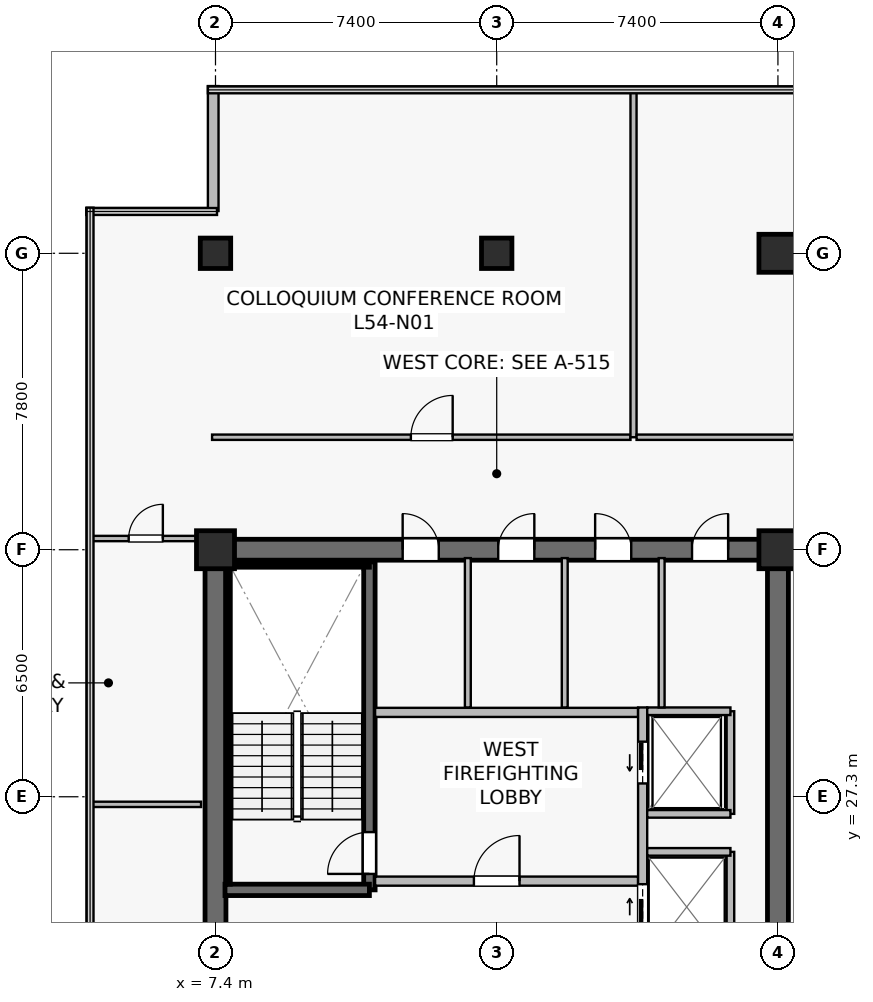
"""IFC4 building model, lengths in metres.
Left out: names, types, materials, properties, quantities, classifications, styles, units other than length and angle.
Written with IfcOpenShell. Run it as: python <this file> out.ifc"""

import sys

from ifc_helpers import new_model, si_unit, direction, frame, frame_2d, origin, origin_2d, place, context, subcontext, project, spatial, rectangle, extrude, source, transform, mapped, element, fill, save


model = new_model("IFC4")
c1 = context("Model", 3, precision=1e-05, world=origin(), true_north=direction((0.0, 1.0)))
c2 = subcontext(c1, "Body", "Model", "MODEL_VIEW")
j1 = project(units=[si_unit("LENGTHUNIT", "METRE"), si_unit("PLANEANGLEUNIT", "RADIAN")], contexts=[c1])
p1 = place(None, origin())
s1 = spatial("IfcSite", under=j1, at=p1, CompositionType="ELEMENT")
p2 = place(p1, origin())
s2 = spatial("IfcBuilding", under=s1, at=p2, CompositionType="ELEMENT")
p3 = place(p2, frame((0.0, 0.0, 226.0)))
s3 = spatial("IfcBuildingStorey", under=s2, at=p3, CompositionType="ELEMENT", Elevation=226.0)
p4 = place(p3, frame((7.125, 33.8, 0.0), z_axis=(0.0, 0.0, 1.0), x_axis=(1.0, 0.0, 0.0)))
e1 = element("IfcWall", 1, at=p4, inside=s3, PredefinedType="SHEAR", context=c2, shape_type="SweptSolid", body=[
    extrude(rectangle(XDim=15.35, YDim=0.55, at=frame_2d((7.675, 0.0))), origin(), (0.0, 0.0, 1.0), 3.8),
])
p5 = place(p4, frame((5.2, 0.0, 0.0)))
e2 = element("IfcOpeningElement", 2, at=p5, cuts=e1, PredefinedType="OPENING", context=c2, shape_type="SweptSolid", body=[
    extrude(rectangle(XDim=0.95, YDim=2.15, at=frame_2d((0.475, 1.075))), frame((0.0, 0.285, 0.0), z_axis=(0.0, -1.0, 0.0), x_axis=(1.0, 0.0, 0.0)), (0.0, 0.0, 1.0), 0.57),
])
p6 = place(p4, frame((7.715, 0.0, 0.0)))
e3 = element("IfcOpeningElement", 3, at=p6, cuts=e1, PredefinedType="OPENING", context=c2, shape_type="SweptSolid", body=[
    extrude(rectangle(XDim=0.95, YDim=2.15, at=frame_2d((0.475, 1.075))), frame((0.0, 0.285, 0.0), z_axis=(0.0, -1.0, 0.0), x_axis=(1.0, 0.0, 0.0)), (0.0, 0.0, 1.0), 0.57),
])
p7 = place(p4, frame((10.265, 0.0, 0.0)))
e4 = element("IfcOpeningElement", 4, at=p7, cuts=e1, PredefinedType="OPENING", context=c2, shape_type="SweptSolid", body=[
    extrude(rectangle(XDim=0.95, YDim=2.15, at=frame_2d((0.475, 1.075))), frame((0.0, 0.285, 0.0), z_axis=(0.0, -1.0, 0.0), x_axis=(1.0, 0.0, 0.0)), (0.0, 0.0, 1.0), 0.57),
])
p8 = place(p4, frame((12.815, 0.0, 0.0)))
e5 = element("IfcOpeningElement", 5, at=p8, cuts=e1, PredefinedType="OPENING", context=c2, shape_type="SweptSolid", body=[
    extrude(rectangle(XDim=0.95, YDim=2.15, at=frame_2d((0.475, 1.075))), frame((0.0, 0.285, 0.0), z_axis=(0.0, -1.0, 0.0), x_axis=(1.0, 0.0, 0.0)), (0.0, 0.0, 1.0), 0.57),
])
p9 = place(p3, frame((7.4, 15.075, 0.0), z_axis=(0.0, 0.0, 1.0), x_axis=(0.0, 1.0, 0.0)))
e6 = element("IfcWall", 6, at=p9, inside=s3, PredefinedType="SHEAR", context=c2, shape_type="SweptSolid", body=[
    extrude(rectangle(XDim=18.45, YDim=0.55, at=frame_2d((9.225, 0.0))), origin(), (0.0, 0.0, 1.0), 3.8),
])
p10 = place(p3, frame((22.2, 15.075, 0.0), z_axis=(0.0, 0.0, 1.0), x_axis=(0.0, 1.0, 0.0)))
e7 = element("IfcWall", 7, at=p10, inside=s3, PredefinedType="SHEAR", context=c2, shape_type="SweptSolid", body=[
    extrude(rectangle(XDim=18.45, YDim=0.55, at=frame_2d((9.225, 0.0))), origin(), (0.0, 0.0, 1.0), 3.8),
])
p11 = place(p10, frame((3.475, 0.0, 0.0)))
e8 = element("IfcOpeningElement", 8, at=p11, cuts=e7, PredefinedType="OPENING", context=c2, shape_type="SweptSolid", body=[
    extrude(rectangle(XDim=1.42, YDim=2.2, at=frame_2d((0.71, 1.1))), frame((0.0, 0.285, 0.0), z_axis=(0.0, -1.0, 0.0), x_axis=(1.0, 0.0, 0.0)), (0.0, 0.0, 1.0), 0.57),
])
p12 = place(p3, frame((11.45, 24.85, 0.0), z_axis=(0.0, 0.0, 1.0), x_axis=(0.0, 1.0, 0.0)))
e9 = element("IfcWall", 9, at=p12, inside=s3, PredefinedType="SHEAR", context=c2, shape_type="SweptSolid", body=[
    extrude(rectangle(XDim=8.63, YDim=0.3, at=frame_2d((4.315, 0.0))), origin(), (0.0, 0.0, 1.0), 3.8),
])
p13 = place(p12, frame((0.42, 0.0, 0.0)))
e10 = element("IfcOpeningElement", 10, at=p13, cuts=e9, PredefinedType="OPENING", context=c2, shape_type="SweptSolid", body=[
    extrude(rectangle(XDim=1.1, YDim=2.15, at=frame_2d((0.55, 1.075))), frame((0.0, 0.16, 0.0), z_axis=(0.0, -1.0, 0.0), x_axis=(1.0, 0.0, 0.0)), (0.0, 0.0, 1.0), 0.32),
])
p14 = place(p3, frame((7.65, 24.85, 0.0), z_axis=(0.0, 0.0, 1.0), x_axis=(1.0, 0.0, 0.0)))
e11 = element("IfcWall", 11, at=p14, inside=s3, PredefinedType="SHEAR", context=c2, shape_type="SweptSolid", body=[
    extrude(rectangle(XDim=3.8, YDim=0.3, at=frame_2d((1.9, 0.0))), origin(), (0.0, 0.0, 1.0), 3.8),
])
p15 = place(p3, frame((7.73, 33.4, 0.0), z_axis=(0.0, 0.0, 1.0), x_axis=(1.0, 0.0, 0.0)))
e12 = element("IfcWall", 12, at=p15, inside=s3, PredefinedType="SOLIDWALL", context=c2, shape_type="SweptSolid", body=[
    extrude(rectangle(XDim=3.72, YDim=0.12, at=frame_2d((1.86, 0.0))), origin(), (0.0, 0.0, 1.0), 3.8),
])
p16 = place(p3, frame((7.73, 25.0, 0.0), z_axis=(0.0, 0.0, 1.0), x_axis=(0.0, 1.0, 0.0)))
e13 = element("IfcWall", 13, at=p16, inside=s3, PredefinedType="SOLIDWALL", context=c2, shape_type="SweptSolid", body=[
    extrude(rectangle(XDim=8.32, YDim=0.12, at=frame_2d((4.16, 0.0))), origin(), (0.0, 0.0, 1.0), 3.8),
])
m1 = source(origin(), c2, "Body", "SweptSolid", [
    extrude(rectangle(XDim=1.0, YDim=1.0, at=origin_2d()), origin(), (0.0, 0.0, 1.0), 4.1),
])
for number, where, z_axis, x_axis in (
    (14, (7.4, 33.8, 0.0), (0.0, 0.0, 1.0), (1.0, 0.0, 0.0)),
    (15, (22.2, 33.8, 0.0), (0.0, 0.0, 1.0), (1.0, 0.0, 0.0)),
):
    element("IfcColumn", number, at=place(p3, frame(where, z_axis=z_axis, x_axis=x_axis)), inside=s3, PredefinedType="COLUMN", context=c2, shape_type="MappedRepresentation", body=[
        mapped(m1, transform((0.0, 0.0, 0.0), scale=1.0)),
    ])
m2 = source(origin(), c2, "Body", "SweptSolid", [
    extrude(rectangle(XDim=0.8, YDim=0.8, at=origin_2d()), origin(), (0.0, 0.0, 1.0), 4.1),
])
p17 = place(p3, frame((14.8, 41.6, 0.0), z_axis=(0.0, 0.0, 1.0), x_axis=(1.0, 0.0, 0.0)))
e16 = element("IfcColumn", 16, at=p17, inside=s3, PredefinedType="COLUMN", context=c2, shape_type="MappedRepresentation", body=[
    mapped(m2, transform((0.0, 0.0, 0.0), scale=1.0)),
])
p18 = place(p3, frame((22.2, 41.6, 0.0), z_axis=(0.0, 0.0, 1.0), x_axis=(1.0, 0.0, 0.0)))
e17 = element("IfcColumn", 17, at=p18, inside=s3, PredefinedType="COLUMN", context=c2, shape_type="MappedRepresentation", body=[
    mapped(m1, transform((0.0, 0.0, 0.0), scale=1.0)),
])
p19 = place(p3, frame((7.4, 41.6, 0.0), z_axis=(0.0, 0.0, 1.0), x_axis=(1.0, 0.0, 0.0)))
e18 = element("IfcColumn", 18, at=p19, inside=s3, PredefinedType="COLUMN", context=c2, shape_type="MappedRepresentation", body=[
    mapped(m2, transform((0.0, 0.0, 0.0), scale=1.0)),
])
p20 = place(p3, frame((7.34, 46.0, 0.0), z_axis=(0.0, 0.0, 1.0), x_axis=(0.0, -1.0, 0.0)))
e19 = element("IfcWall", 19, at=p20, inside=s3, PredefinedType="STANDARD", context=c2, shape_type="SweptSolid", body=[
    extrude(rectangle(XDim=3.288, YDim=0.28, at=frame_2d((1.644, 0.0))), origin(), (0.0, 0.0, 1.0), 3.8),
])
p21 = place(p3, frame((11.6, 25.08, 0.0), z_axis=(0.0, 0.0, 1.0), x_axis=(1.0, 0.0, 0.0)))
e20 = element("IfcWall", 20, at=p21, inside=s3, PredefinedType="SOLIDWALL", context=c2, shape_type="SweptSolid", body=[
    extrude(rectangle(XDim=6.92, YDim=0.24, at=frame_2d((3.46, 0.0))), origin(), (0.0, 0.0, 1.0), 3.197),
])
p22 = place(p21, frame((2.6, 0.0, 0.0)))
e21 = element("IfcOpeningElement", 21, at=p22, cuts=e20, PredefinedType="OPENING", context=c2, shape_type="SweptSolid", body=[
    extrude(rectangle(XDim=1.2, YDim=2.16, at=frame_2d((0.6, 1.08))), frame((0.0, 0.13, 0.0), z_axis=(0.0, -1.0, 0.0), x_axis=(1.0, 0.0, 0.0)), (0.0, 0.0, 1.0), 0.26),
])
p23 = place(p3, frame((11.6, 29.52, 0.0), z_axis=(0.0, 0.0, 1.0), x_axis=(1.0, 0.0, 0.0)))
e22 = element("IfcWall", 22, at=p23, inside=s3, PredefinedType="SOLIDWALL", context=c2, shape_type="SweptSolid", body=[
    extrude(rectangle(XDim=6.92, YDim=0.24, at=frame_2d((3.46, 0.0))), origin(), (0.0, 0.0, 1.0), 3.197),
])
p24 = place(p3, frame((18.64, 22.8, 0.0), z_axis=(0.0, 0.0, 1.0), x_axis=(0.0, 1.0, 0.0)))
e23 = element("IfcWall", 23, at=p24, inside=s3, PredefinedType="SOLIDWALL", context=c2, shape_type="SweptSolid", body=[
    extrude(rectangle(XDim=6.85, YDim=0.24, at=frame_2d((3.425, 0.0))), origin(), (0.0, 0.0, 1.0), 2.935),
])
p25 = place(p24, frame((4.85, 0.0, 0.0)))
e24 = element("IfcOpeningElement", 24, at=p25, cuts=e23, PredefinedType="OPENING", context=c2, shape_type="SweptSolid", body=[
    extrude(rectangle(XDim=1.1, YDim=2.22, at=frame_2d((0.55, 1.11))), frame((0.0, 0.13, 0.0), z_axis=(0.0, -1.0, 0.0), x_axis=(1.0, 0.0, 0.0)), (0.0, 0.0, 1.0), 0.26),
])
p26 = place(p24, frame((1.0, 0.0, 0.0)))
e25 = element("IfcOpeningElement", 25, at=p26, cuts=e23, PredefinedType="OPENING", context=c2, shape_type="SweptSolid", body=[
    extrude(rectangle(XDim=1.2, YDim=2.22, at=frame_2d((0.6, 1.11))), frame((0.0, 0.13, 0.0), z_axis=(0.0, -1.0, 0.0), x_axis=(1.0, 0.0, 0.0)), (0.0, 0.0, 1.0), 0.26),
])
p27 = place(p3, frame((20.95, 26.85, 0.0), z_axis=(0.0, 0.0, 1.0), x_axis=(0.0, 1.0, 0.0)))
e26 = element("IfcWall", 26, at=p27, inside=s3, PredefinedType="SOLIDWALL", context=c2, shape_type="SweptSolid", body=[
    extrude(rectangle(XDim=2.7, YDim=0.2, at=frame_2d((1.35, 0.0))), origin(), (0.0, 0.0, 1.0), 3.8),
])
p28 = place(p3, frame((18.76, 29.55, 0.0), z_axis=(0.0, 0.0, 1.0), x_axis=(1.0, 0.0, 0.0)))
e27 = element("IfcWall", 27, at=p28, inside=s3, PredefinedType="SOLIDWALL", context=c2, shape_type="SweptSolid", body=[
    extrude(rectangle(XDim=2.19, YDim=0.2, at=frame_2d((1.095, 0.0))), origin(), (0.0, 0.0, 1.0), 3.8),
])
p29 = place(p3, frame((18.76, 26.85, 0.0), z_axis=(0.0, 0.0, 1.0), x_axis=(1.0, 0.0, 0.0)))
e28 = element("IfcWall", 28, at=p29, inside=s3, PredefinedType="SOLIDWALL", context=c2, shape_type="SweptSolid", body=[
    extrude(rectangle(XDim=2.19, YDim=0.2, at=frame_2d((1.095, 0.0))), origin(), (0.0, 0.0, 1.0), 3.197),
])
p30 = place(p3, frame((20.95, 22.95, 0.0), z_axis=(0.0, 0.0, 1.0), x_axis=(0.0, 1.0, 0.0)))
e29 = element("IfcWall", 29, at=p30, inside=s3, PredefinedType="SOLIDWALL", context=c2, shape_type="SweptSolid", body=[
    extrude(rectangle(XDim=2.9, YDim=0.2, at=frame_2d((1.45, 0.0))), origin(), (0.0, 0.0, 1.0), 2.935),
])
p31 = place(p3, frame((18.76, 25.85, 0.0), z_axis=(0.0, 0.0, 1.0), x_axis=(1.0, 0.0, 0.0)))
e30 = element("IfcWall", 30, at=p31, inside=s3, PredefinedType="SOLIDWALL", context=c2, shape_type="SweptSolid", body=[
    extrude(rectangle(XDim=2.19, YDim=0.2, at=frame_2d((1.095, 0.0))), origin(), (0.0, 0.0, 1.0), 3.8),
])
for number, where, z_axis, x_axis in (
    (31, (14.04, 29.65, 0.0), (0.0, 0.0, 1.0), (0.0, 1.0, 0.0)),
    (32, (16.59, 29.65, 0.0), (0.0, 0.0, 1.0), (0.0, 1.0, 0.0)),
    (33, (19.14, 29.65, 0.0), (0.0, 0.0, 1.0), (0.0, 1.0, 0.0)),
):
    element("IfcWall", number, at=place(p3, frame(where, z_axis=z_axis, x_axis=x_axis)), inside=s3, PredefinedType="PLUMBINGWALL", context=c2, shape_type="SweptSolid", body=[
        extrude(rectangle(XDim=3.93, YDim=0.155, at=frame_2d((1.965, 0.0))), origin(), (0.0, 0.0, 1.0), 3.8),
    ])
p32 = place(p3, frame((7.31, 36.76, 0.0), z_axis=(0.0, 0.0, 1.0), x_axis=(1.0, 0.0, 0.0)))
e34 = element("IfcWall", 34, at=p32, inside=s3, PredefinedType="PARTITIONING", context=c2, shape_type="SweptSolid", body=[
    extrude(rectangle(XDim=11.01, YDim=0.14, at=frame_2d((5.505, 0.0))), origin(), (0.0, 0.0, 1.0), 3.197),
])
p33 = place(p32, frame((5.231, 0.0, 0.0)))
e35 = element("IfcOpeningElement", 35, at=p33, cuts=e34, PredefinedType="OPENING", context=c2, shape_type="SweptSolid", body=[
    extrude(rectangle(XDim=1.1, YDim=2.18, at=frame_2d((0.55, 1.09))), frame((0.0, 0.08, 0.0), z_axis=(0.0, -1.0, 0.0), x_axis=(1.0, 0.0, 0.0)), (0.0, 0.0, 1.0), 0.16),
])
p34 = place(p3, frame((18.4, 36.76, 0.0), z_axis=(0.0, 0.0, 1.0), x_axis=(0.0, 1.0, 0.0)))
e36 = element("IfcWall", 36, at=p34, inside=s3, PredefinedType="PARTITIONING", context=c2, shape_type="SweptSolid", body=[
    extrude(rectangle(XDim=9.13, YDim=0.16, at=frame_2d((4.565, 0.0))), origin(), (0.0, 0.0, 1.0), 3.135),
])
p35 = place(p3, frame((18.48, 36.76, 0.0), z_axis=(0.0, 0.0, 1.0), x_axis=(1.0, 0.0, 0.0)))
e37 = element("IfcWall", 37, at=p35, inside=s3, PredefinedType="PARTITIONING", context=c2, shape_type="SweptSolid", body=[
    extrude(rectangle(XDim=20.04, YDim=0.14, at=frame_2d((10.02, 0.0))), origin(), (0.0, 0.0, 1.0), 3.197),
])
p36 = place(p35, frame((7.828, 0.0, 0.0)))
e38 = element("IfcOpeningElement", 38, at=p36, cuts=e37, PredefinedType="OPENING", context=c2, shape_type="SweptSolid", body=[
    extrude(rectangle(XDim=1.1, YDim=2.18, at=frame_2d((0.55, 1.09))), frame((0.0, 0.08, 0.0), z_axis=(0.0, -1.0, 0.0), x_axis=(1.0, 0.0, 0.0)), (0.0, 0.0, 1.0), 0.16),
])
p37 = place(p3, frame((4.11, 27.1, 0.0), z_axis=(0.0, 0.0, 1.0), x_axis=(1.0, 0.0, 0.0)))
e39 = element("IfcWall", 39, at=p37, inside=s3, PredefinedType="PARTITIONING", context=c2, shape_type="SweptSolid", body=[
    extrude(rectangle(XDim=2.91, YDim=0.14, at=frame_2d((1.455, 0.0))), origin(), (0.0, 0.0, 1.0), 3.8),
])
p38 = place(p3, frame((4.11, 34.095, 0.0), z_axis=(0.0, 0.0, 1.0), x_axis=(1.0, 0.0, 0.0)))
e40 = element("IfcWall", 40, at=p38, inside=s3, PredefinedType="PARTITIONING", context=c2, shape_type="SweptSolid", body=[
    extrude(rectangle(XDim=2.91, YDim=0.14, at=frame_2d((1.455, 0.0))), origin(), (0.0, 0.0, 1.0), 3.8),
])
p39 = place(p38, frame((1.005, 0.0, 0.0)))
e41 = element("IfcOpeningElement", 41, at=p39, cuts=e40, PredefinedType="OPENING", context=c2, shape_type="SweptSolid", body=[
    extrude(rectangle(XDim=0.9, YDim=2.1, at=frame_2d((0.45, 1.05))), frame((0.0, 0.08, 0.0), z_axis=(0.0, -1.0, 0.0), x_axis=(1.0, 0.0, 0.0)), (0.0, 0.0, 1.0), 0.16),
])
m3 = source(origin(), c2, "Body", "SweptSolid", [
    extrude(rectangle(XDim=1.1, YDim=2.15, at=frame_2d((0.55, 1.075))), frame((0.0, 0.025, 0.0), z_axis=(0.0, -1.0, 0.0), x_axis=(1.0, 0.0, 0.0)), (0.0, 0.0, 1.0), 0.05),
])
p40 = place(p13, origin())
e42 = element("IfcDoor", 42, at=p40, inside=s3, OperationType="SINGLE_SWING_LEFT", PredefinedType="DOOR", context=c2, shape_type="MappedRepresentation", body=[
    mapped(m3, transform((0.0, 0.0, 0.0), scale=1.0)),
])
fill(e10, e42)
m4 = source(origin(), c2, "Body", "SweptSolid", [
    extrude(rectangle(XDim=1.2, YDim=2.16, at=frame_2d((0.6, 1.08))), frame((0.0, 0.025, 0.0), z_axis=(0.0, -1.0, 0.0), x_axis=(1.0, 0.0, 0.0)), (0.0, 0.0, 1.0), 0.05),
])
p41 = place(p22, origin())
e43 = element("IfcDoor", 43, at=p41, inside=s3, OperationType="SINGLE_SWING_RIGHT", PredefinedType="DOOR", context=c2, shape_type="MappedRepresentation", body=[
    mapped(m4, transform((0.0, 0.0, 0.0), scale=1.0)),
])
fill(e21, e43)
m5 = source(origin(), c2, "Body", "SweptSolid", [
    extrude(rectangle(XDim=1.1, YDim=2.22, at=frame_2d((0.55, 1.11))), frame((0.0, 0.025, 0.0), z_axis=(0.0, -1.0, 0.0), x_axis=(1.0, 0.0, 0.0)), (0.0, 0.0, 1.0), 0.05),
])
p42 = place(p25, origin())
e44 = element("IfcDoor", 44, at=p42, inside=s3, OperationType="SLIDING_TO_LEFT", PredefinedType="USERDEFINED", context=c2, shape_type="MappedRepresentation", body=[
    mapped(m5, transform((0.0, 0.0, 0.0), scale=1.0)),
])
fill(e24, e44)
m6 = source(origin(), c2, "Body", "SweptSolid", [
    extrude(rectangle(XDim=1.2, YDim=2.22, at=frame_2d((0.6, 1.11))), frame((0.0, 0.025, 0.0), z_axis=(0.0, -1.0, 0.0), x_axis=(1.0, 0.0, 0.0)), (0.0, 0.0, 1.0), 0.05),
])
p43 = place(p26, origin())
e45 = element("IfcDoor", 45, at=p43, inside=s3, OperationType="SLIDING_TO_RIGHT", PredefinedType="USERDEFINED", context=c2, shape_type="MappedRepresentation", body=[
    mapped(m6, transform((0.0, 0.0, 0.0), scale=1.0)),
])
fill(e25, e45)
m7 = source(origin(), c2, "Body", "SweptSolid", [
    extrude(rectangle(XDim=0.95, YDim=2.15, at=frame_2d((0.475, 1.075))), frame((0.0, 0.025, 0.0), z_axis=(0.0, -1.0, 0.0), x_axis=(1.0, 0.0, 0.0)), (0.0, 0.0, 1.0), 0.05),
])
p44 = place(p5, origin())
e46 = element("IfcDoor", 46, at=p44, inside=s3, OperationType="SINGLE_SWING_LEFT", PredefinedType="DOOR", context=c2, shape_type="MappedRepresentation", body=[
    mapped(m7, transform((0.0, 0.0, 0.0), scale=1.0)),
])
fill(e2, e46)
p45 = place(p6, origin())
e47 = element("IfcDoor", 47, at=p45, inside=s3, OperationType="SINGLE_SWING_RIGHT", PredefinedType="DOOR", context=c2, shape_type="MappedRepresentation", body=[
    mapped(m7, transform((0.0, 0.0, 0.0), scale=1.0)),
])
fill(e3, e47)
p46 = place(p7, origin())
e48 = element("IfcDoor", 48, at=p46, inside=s3, OperationType="SINGLE_SWING_LEFT", PredefinedType="DOOR", context=c2, shape_type="MappedRepresentation", body=[
    mapped(m7, transform((0.0, 0.0, 0.0), scale=1.0)),
])
fill(e4, e48)
p47 = place(p8, origin())
e49 = element("IfcDoor", 49, at=p47, inside=s3, OperationType="SINGLE_SWING_RIGHT", PredefinedType="DOOR", context=c2, shape_type="MappedRepresentation", body=[
    mapped(m7, transform((0.0, 0.0, 0.0), scale=1.0)),
])
fill(e5, e49)
m8 = source(origin(), c2, "Body", "SweptSolid", [
    extrude(rectangle(XDim=1.1, YDim=2.18, at=frame_2d((0.55, 1.09))), frame((0.0, 0.025, 0.0), z_axis=(0.0, -1.0, 0.0), x_axis=(1.0, 0.0, 0.0)), (0.0, 0.0, 1.0), 0.05),
])
p48 = place(p33, origin())
e50 = element("IfcDoor", 50, at=p48, inside=s3, OperationType="SINGLE_SWING_RIGHT", PredefinedType="DOOR", context=c2, shape_type="MappedRepresentation", body=[
    mapped(m8, transform((0.0, 0.0, 0.0), scale=1.0)),
])
fill(e35, e50)
m9 = source(origin(), c2, "Body", "SweptSolid", [
    extrude(rectangle(XDim=0.9, YDim=2.1, at=frame_2d((0.45, 1.05))), frame((0.0, 0.025, 0.0), z_axis=(0.0, -1.0, 0.0), x_axis=(1.0, 0.0, 0.0)), (0.0, 0.0, 1.0), 0.05),
])
p49 = place(p39, origin())
e51 = element("IfcDoor", 51, at=p49, inside=s3, OperationType="SINGLE_SWING_RIGHT", PredefinedType="DOOR", context=c2, shape_type="MappedRepresentation", body=[
    mapped(m9, transform((0.0, 0.0, 0.0), scale=1.0)),
])
fill(e41, e51)
save(model, sys.argv[1])
